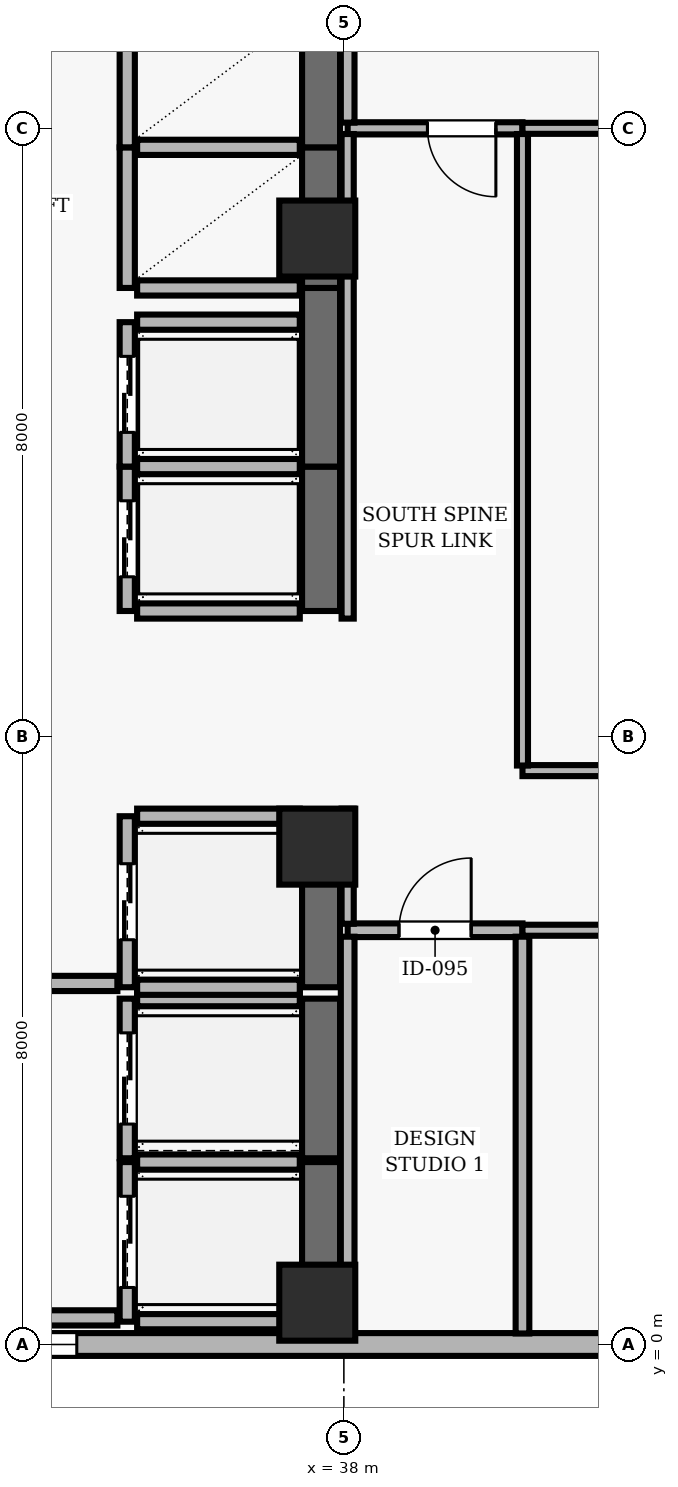
"""IFC4 building model, lengths in metres.
Left out: names, types, materials, properties, quantities, classifications, styles, units other than length and angle.
Written with IfcOpenShell. Run it as: python <this file> out.ifc"""

import sys

from ifc_helpers import new_model, si_unit, direction, frame, frame_2d, origin, origin_2d, place, context, subcontext, project, spatial, rectangle, extrude, element, fill, save


model = new_model("IFC4")
c1 = context("Model", 3, precision=1e-05, world=origin(), true_north=direction((0.0, 1.0)))
c2 = subcontext(c1, "Body", "Model", "MODEL_VIEW")
j1 = project(units=[si_unit("LENGTHUNIT", "METRE"), si_unit("PLANEANGLEUNIT", "RADIAN")], contexts=[c1])
p1 = place(None, origin())
s1 = spatial("IfcSite", under=j1, at=p1, CompositionType="ELEMENT")
p2 = place(p1, origin())
s2 = spatial("IfcBuilding", under=s1, at=p2, CompositionType="ELEMENT")
p3 = place(p2, frame((0.0, 0.0, 187.5)))
s3 = spatial("IfcBuildingStorey", under=s2, at=p3, CompositionType="ELEMENT", Elevation=187.5)
for number, where, z_axis, x_axis in (
    (1, (37.65, 0.55, 0.0), (0.0, 0.0, 1.0), (1.0, 0.0, 0.0)),
    (2, (37.65, 6.55, 0.0), (0.0, 0.0, 1.0), (1.0, 0.0, 0.0)),
    (3, (37.65, 14.55, 0.0), (0.0, 0.0, 1.0), (1.0, 0.0, 0.0)),
):
    element("IfcColumn", number, at=place(p3, frame(where, z_axis=z_axis, x_axis=x_axis)), inside=s3, PredefinedType="COLUMN", context=c2, shape_type="SweptSolid", body=[
        extrude(rectangle(XDim=1.0, YDim=1.0, at=origin_2d()), origin(), (0.0, 0.0, 1.0), 3.9),
    ])
p4 = place(p3, frame((24.5, 0.0, 0.0), z_axis=(0.0, 0.0, 1.0), x_axis=(1.0, 0.0, 0.0)))
e4 = element("IfcWall", 4, at=p4, inside=s3, PredefinedType="SOLIDWALL", context=c2, shape_type="SweptSolid", body=[
    extrude(rectangle(XDim=38.2, YDim=0.3, at=frame_2d((19.1, 0.0))), origin(), (0.0, 0.0, 1.0), 3.69),
])
p5 = place(p4, frame((1.829, 0.0, 0.9)))
e5 = element("IfcOpeningElement", 5, at=p5, cuts=e4, PredefinedType="OPENING", context=c2, shape_type="SweptSolid", body=[
    extrude(rectangle(XDim=1.8, YDim=2.2, at=frame_2d((0.9, 1.1))), frame((0.0, 0.16, 0.0), z_axis=(0.0, -1.0, 0.0), x_axis=(1.0, 0.0, 0.0)), (0.0, 0.0, 1.0), 0.32),
])
p6 = place(p4, frame((8.186, 0.0, 0.9)))
e6 = element("IfcOpeningElement", 6, at=p6, cuts=e4, PredefinedType="OPENING", context=c2, shape_type="SweptSolid", body=[
    extrude(rectangle(XDim=1.8, YDim=2.2, at=frame_2d((0.9, 1.1))), frame((0.0, 0.16, 0.0), z_axis=(0.0, -1.0, 0.0), x_axis=(1.0, 0.0, 0.0)), (0.0, 0.0, 1.0), 0.32),
])
p7 = place(p4, frame((18.2, 0.0, 0.9)))
e7 = element("IfcOpeningElement", 7, at=p7, cuts=e4, PredefinedType="OPENING", context=c2, shape_type="SweptSolid", body=[
    extrude(rectangle(XDim=1.8, YDim=2.2, at=frame_2d((0.9, 1.1))), frame((0.0, 0.16, 0.0), z_axis=(0.0, -1.0, 0.0), x_axis=(1.0, 0.0, 0.0)), (0.0, 0.0, 1.0), 0.32),
])
p8 = place(p4, frame((23.657, 0.0, 0.9)))
e8 = element("IfcOpeningElement", 8, at=p8, cuts=e4, PredefinedType="OPENING", context=c2, shape_type="SweptSolid", body=[
    extrude(rectangle(XDim=1.8, YDim=2.2, at=frame_2d((0.9, 1.1))), frame((0.0, 0.16, 0.0), z_axis=(0.0, -1.0, 0.0), x_axis=(1.0, 0.0, 0.0)), (0.0, 0.0, 1.0), 0.32),
])
p9 = place(p4, frame((29.114, 0.0, 0.9)))
e9 = element("IfcOpeningElement", 9, at=p9, cuts=e4, PredefinedType="OPENING", context=c2, shape_type="SweptSolid", body=[
    extrude(rectangle(XDim=1.8, YDim=2.2, at=frame_2d((0.9, 1.1))), frame((0.0, 0.16, 0.0), z_axis=(0.0, -1.0, 0.0), x_axis=(1.0, 0.0, 0.0)), (0.0, 0.0, 1.0), 0.32),
])
p10 = place(p4, frame((34.571, 0.0, 0.9)))
e10 = element("IfcOpeningElement", 10, at=p10, cuts=e4, PredefinedType="OPENING", context=c2, shape_type="SweptSolid", body=[
    extrude(rectangle(XDim=1.8, YDim=2.2, at=frame_2d((0.9, 1.1))), frame((0.0, 0.16, 0.0), z_axis=(0.0, -1.0, 0.0), x_axis=(1.0, 0.0, 0.0)), (0.0, 0.0, 1.0), 0.32),
])
p11 = place(p3, frame((35.15, 2.4, 0.0), z_axis=(0.0, 0.0, 1.0), x_axis=(0.0, -1.0, 0.0)))
e11 = element("IfcWall", 11, at=p11, inside=s3, PredefinedType="SOLIDWALL", context=c2, shape_type="SweptSolid", body=[
    extrude(rectangle(XDim=2.1, YDim=0.2, at=frame_2d((1.05, 0.0))), origin(), (0.0, 0.0, 1.0), 3.69),
])
p12 = place(p11, frame((0.45, 0.0, 0.0)))
e12 = element("IfcOpeningElement", 12, at=p12, cuts=e11, PredefinedType="OPENING", context=c2, shape_type="SweptSolid", body=[
    extrude(rectangle(XDim=1.2, YDim=2.15, at=frame_2d((0.6, 1.075))), frame((0.0, 0.11, 0.0), z_axis=(0.0, -1.0, 0.0), x_axis=(1.0, 0.0, 0.0)), (0.0, 0.0, 1.0), 0.22),
])
p13 = place(p3, frame((37.7, 0.3, 0.0), z_axis=(0.0, 0.0, 1.0), x_axis=(0.0, 1.0, 0.0)))
e13 = element("IfcWall", 13, at=p13, inside=s3, PredefinedType="SHEAR", context=c2, shape_type="SweptSolid", body=[
    extrude(rectangle(XDim=2.1, YDim=0.5, at=frame_2d((1.05, 0.0))), origin(), (0.0, 0.0, 1.0), 3.69),
])
for number, where, z_axis, x_axis in (
    (14, (35.28, 0.3, 0.0), (0.0, 0.0, 1.0), (1.0, 0.0, 0.0)),
    (15, (37.42, 2.4, 0.0), (0.0, 0.0, 1.0), (-1.0, 0.0, 0.0)),
):
    element("IfcWall", number, at=place(p3, frame(where, z_axis=z_axis, x_axis=x_axis)), inside=s3, PredefinedType="SOLIDWALL", context=c2, shape_type="SweptSolid", body=[
        extrude(rectangle(XDim=2.14, YDim=0.2, at=frame_2d((1.07, 0.0))), origin(), (0.0, 0.0, 1.0), 3.69),
    ])
p14 = place(p3, frame((35.15, 4.55, 0.0), z_axis=(0.0, 0.0, 1.0), x_axis=(0.0, -1.0, 0.0)))
e16 = element("IfcWall", 16, at=p14, inside=s3, PredefinedType="SOLIDWALL", context=c2, shape_type="SweptSolid", body=[
    extrude(rectangle(XDim=2.1, YDim=0.2, at=frame_2d((1.05, 0.0))), origin(), (0.0, 0.0, 1.0), 3.69),
])
p15 = place(p14, frame((0.45, 0.0, 0.0)))
e17 = element("IfcOpeningElement", 17, at=p15, cuts=e16, PredefinedType="OPENING", context=c2, shape_type="SweptSolid", body=[
    extrude(rectangle(XDim=1.2, YDim=2.15, at=frame_2d((0.6, 1.075))), frame((0.0, 0.11, 0.0), z_axis=(0.0, -1.0, 0.0), x_axis=(1.0, 0.0, 0.0)), (0.0, 0.0, 1.0), 0.22),
])
p16 = place(p3, frame((37.7, 2.45, 0.0), z_axis=(0.0, 0.0, 1.0), x_axis=(0.0, 1.0, 0.0)))
e18 = element("IfcWall", 18, at=p16, inside=s3, PredefinedType="SHEAR", context=c2, shape_type="SweptSolid", body=[
    extrude(rectangle(XDim=2.1, YDim=0.5, at=frame_2d((1.05, 0.0))), origin(), (0.0, 0.0, 1.0), 3.69),
])
p17 = place(p3, frame((37.42, 4.55, 0.0), z_axis=(0.0, 0.0, 1.0), x_axis=(-1.0, 0.0, 0.0)))
e19 = element("IfcWall", 19, at=p17, inside=s3, PredefinedType="SOLIDWALL", context=c2, shape_type="SweptSolid", body=[
    extrude(rectangle(XDim=2.14, YDim=0.2, at=frame_2d((1.07, 0.0))), origin(), (0.0, 0.0, 1.0), 3.69),
])
p18 = place(p3, frame((35.15, 6.95, 0.0), z_axis=(0.0, 0.0, 1.0), x_axis=(0.0, -1.0, 0.0)))
e20 = element("IfcWall", 20, at=p18, inside=s3, PredefinedType="SOLIDWALL", context=c2, shape_type="SweptSolid", body=[
    extrude(rectangle(XDim=2.25, YDim=0.2, at=frame_2d((1.125, 0.0))), origin(), (0.0, 0.0, 1.0), 3.69),
])
p19 = place(p18, frame((0.625, 0.0, 0.0)))
e21 = element("IfcOpeningElement", 21, at=p19, cuts=e20, PredefinedType="OPENING", context=c2, shape_type="SweptSolid", body=[
    extrude(rectangle(XDim=1.0, YDim=2.1, at=frame_2d((0.5, 1.05))), frame((0.0, 0.11, 0.0), z_axis=(0.0, -1.0, 0.0), x_axis=(1.0, 0.0, 0.0)), (0.0, 0.0, 1.0), 0.22),
])
p20 = place(p3, frame((37.7, 4.7, 0.0), z_axis=(0.0, 0.0, 1.0), x_axis=(0.0, 1.0, 0.0)))
e22 = element("IfcWall", 22, at=p20, inside=s3, PredefinedType="SHEAR", context=c2, shape_type="SweptSolid", body=[
    extrude(rectangle(XDim=2.25, YDim=0.5, at=frame_2d((1.125, 0.0))), origin(), (0.0, 0.0, 1.0), 3.69),
])
for number, where, z_axis, x_axis in (
    (23, (35.28, 4.7, 0.0), (0.0, 0.0, 1.0), (1.0, 0.0, 0.0)),
    (24, (37.42, 6.95, 0.0), (0.0, 0.0, 1.0), (-1.0, 0.0, 0.0)),
):
    element("IfcWall", number, at=place(p3, frame(where, z_axis=z_axis, x_axis=x_axis)), inside=s3, PredefinedType="SOLIDWALL", context=c2, shape_type="SweptSolid", body=[
        extrude(rectangle(XDim=2.14, YDim=0.2, at=frame_2d((1.07, 0.0))), origin(), (0.0, 0.0, 1.0), 3.69),
    ])
p21 = place(p3, frame((35.15, 11.55, 0.0), z_axis=(0.0, 0.0, 1.0), x_axis=(0.0, -1.0, 0.0)))
e25 = element("IfcWall", 25, at=p21, inside=s3, PredefinedType="SOLIDWALL", context=c2, shape_type="SweptSolid", body=[
    extrude(rectangle(XDim=1.9, YDim=0.2, at=frame_2d((0.95, 0.0))), origin(), (0.0, 0.0, 1.0), 3.69),
])
p22 = place(p21, frame((0.45, 0.0, 0.0)))
e26 = element("IfcOpeningElement", 26, at=p22, cuts=e25, PredefinedType="OPENING", context=c2, shape_type="SweptSolid", body=[
    extrude(rectangle(XDim=1.0, YDim=2.1, at=frame_2d((0.5, 1.05))), frame((0.0, 0.11, 0.0), z_axis=(0.0, -1.0, 0.0), x_axis=(1.0, 0.0, 0.0)), (0.0, 0.0, 1.0), 0.22),
])
p23 = place(p3, frame((37.7, 9.65, 0.0), z_axis=(0.0, 0.0, 1.0), x_axis=(0.0, 1.0, 0.0)))
e27 = element("IfcWall", 27, at=p23, inside=s3, PredefinedType="SHEAR", context=c2, shape_type="SweptSolid", body=[
    extrude(rectangle(XDim=1.9, YDim=0.5, at=frame_2d((0.95, 0.0))), origin(), (0.0, 0.0, 1.0), 3.69),
])
for number, where, z_axis, x_axis in (
    (28, (35.28, 9.65, 0.0), (0.0, 0.0, 1.0), (1.0, 0.0, 0.0)),
    (29, (37.42, 11.55, 0.0), (0.0, 0.0, 1.0), (-1.0, 0.0, 0.0)),
):
    element("IfcWall", number, at=place(p3, frame(where, z_axis=z_axis, x_axis=x_axis)), inside=s3, PredefinedType="SOLIDWALL", context=c2, shape_type="SweptSolid", body=[
        extrude(rectangle(XDim=2.14, YDim=0.2, at=frame_2d((1.07, 0.0))), origin(), (0.0, 0.0, 1.0), 3.69),
    ])
p24 = place(p3, frame((35.15, 13.45, 0.0), z_axis=(0.0, 0.0, 1.0), x_axis=(0.0, -1.0, 0.0)))
e30 = element("IfcWall", 30, at=p24, inside=s3, PredefinedType="SOLIDWALL", context=c2, shape_type="SweptSolid", body=[
    extrude(rectangle(XDim=1.9, YDim=0.2, at=frame_2d((0.95, 0.0))), origin(), (0.0, 0.0, 1.0), 3.69),
])
p25 = place(p24, frame((0.45, 0.0, 0.0)))
e31 = element("IfcOpeningElement", 31, at=p25, cuts=e30, PredefinedType="OPENING", context=c2, shape_type="SweptSolid", body=[
    extrude(rectangle(XDim=1.0, YDim=2.1, at=frame_2d((0.5, 1.05))), frame((0.0, 0.11, 0.0), z_axis=(0.0, -1.0, 0.0), x_axis=(1.0, 0.0, 0.0)), (0.0, 0.0, 1.0), 0.22),
])
p26 = place(p3, frame((37.7, 11.55, 0.0), z_axis=(0.0, 0.0, 1.0), x_axis=(0.0, 1.0, 0.0)))
e32 = element("IfcWall", 32, at=p26, inside=s3, PredefinedType="SHEAR", context=c2, shape_type="SweptSolid", body=[
    extrude(rectangle(XDim=2.35, YDim=0.5, at=frame_2d((1.175, 0.0))), origin(), (0.0, 0.0, 1.0), 3.69),
])
p27 = place(p3, frame((37.42, 13.45, 0.0), z_axis=(0.0, 0.0, 1.0), x_axis=(-1.0, 0.0, 0.0)))
e33 = element("IfcWall", 33, at=p27, inside=s3, PredefinedType="SOLIDWALL", context=c2, shape_type="SweptSolid", body=[
    extrude(rectangle(XDim=2.14, YDim=0.2, at=frame_2d((1.07, 0.0))), origin(), (0.0, 0.0, 1.0), 3.69),
])
p28 = place(p3, frame((35.15, 15.75, 0.0), z_axis=(0.0, 0.0, 1.0), x_axis=(0.0, -1.0, 0.0)))
e34 = element("IfcWall", 34, at=p28, inside=s3, PredefinedType="SOLIDWALL", context=c2, shape_type="SweptSolid", body=[
    extrude(rectangle(XDim=1.85, YDim=0.2, at=frame_2d((0.925, 0.0))), origin(), (0.0, 0.0, 1.0), 3.69),
])
p29 = place(p3, frame((37.7, 13.9, 0.0), z_axis=(0.0, 0.0, 1.0), x_axis=(0.0, 1.0, 0.0)))
e35 = element("IfcWall", 35, at=p29, inside=s3, PredefinedType="SHEAR", context=c2, shape_type="SweptSolid", body=[
    extrude(rectangle(XDim=1.85, YDim=0.5, at=frame_2d((0.925, 0.0))), origin(), (0.0, 0.0, 1.0), 3.69),
])
for number, where, z_axis, x_axis in (
    (36, (35.28, 13.9, 0.0), (0.0, 0.0, 1.0), (1.0, 0.0, 0.0)),
    (37, (37.42, 15.75, 0.0), (0.0, 0.0, 1.0), (-1.0, 0.0, 0.0)),
):
    element("IfcWall", number, at=place(p3, frame(where, z_axis=z_axis, x_axis=x_axis)), inside=s3, PredefinedType="SOLIDWALL", context=c2, shape_type="SweptSolid", body=[
        extrude(rectangle(XDim=2.14, YDim=0.2, at=frame_2d((1.07, 0.0))), origin(), (0.0, 0.0, 1.0), 3.69),
    ])
p30 = place(p3, frame((35.15, 17.6, 0.0), z_axis=(0.0, 0.0, 1.0), x_axis=(0.0, -1.0, 0.0)))
e38 = element("IfcWall", 38, at=p30, inside=s3, PredefinedType="SOLIDWALL", context=c2, shape_type="SweptSolid", body=[
    extrude(rectangle(XDim=1.85, YDim=0.2, at=frame_2d((0.925, 0.0))), origin(), (0.0, 0.0, 1.0), 3.69),
])
p31 = place(p3, frame((37.7, 15.75, 0.0), z_axis=(0.0, 0.0, 1.0), x_axis=(0.0, 1.0, 0.0)))
e39 = element("IfcWall", 39, at=p31, inside=s3, PredefinedType="SHEAR", context=c2, shape_type="SweptSolid", body=[
    extrude(rectangle(XDim=1.85, YDim=0.5, at=frame_2d((0.925, 0.0))), origin(), (0.0, 0.0, 1.0), 3.69),
])
p32 = place(p3, frame((31.65, 0.35, 0.0), z_axis=(0.0, 0.0, 1.0), x_axis=(1.0, 0.0, 0.0)))
e40 = element("IfcWall", 40, at=p32, inside=s3, PredefinedType="SOLIDWALL", context=c2, shape_type="SweptSolid", body=[
    extrude(rectangle(XDim=3.37, YDim=0.2, at=frame_2d((1.685, 0.0))), origin(), (0.0, 0.0, 1.0), 3.69),
])
p33 = place(p3, frame((35.02, 4.75, 0.0), z_axis=(0.0, 0.0, 1.0), x_axis=(-1.0, 0.0, 0.0)))
e41 = element("IfcWall", 41, at=p33, inside=s3, PredefinedType="SOLIDWALL", context=c2, shape_type="SweptSolid", body=[
    extrude(rectangle(XDim=3.11, YDim=0.2, at=frame_2d((1.555, 0.0))), origin(), (0.0, 0.0, 1.0), 3.69),
])
p34 = place(p33, frame((1.03, 0.0, 0.0)))
e42 = element("IfcOpeningElement", 42, at=p34, cuts=e41, PredefinedType="OPENING", context=c2, shape_type="SweptSolid", body=[
    extrude(rectangle(XDim=1.05, YDim=2.15, at=frame_2d((0.525, 1.075))), frame((0.0, 0.11, 0.0), z_axis=(0.0, -1.0, 0.0), x_axis=(1.0, 0.0, 0.0)), (0.0, 0.0, 1.0), 0.22),
])
p35 = place(p3, frame((38.05, 5.45, 0.0), z_axis=(0.0, 0.0, 1.0), x_axis=(1.0, 0.0, 0.0)))
e43 = element("IfcWall", 43, at=p35, inside=s3, PredefinedType="PARTITIONING", context=c2, shape_type="SweptSolid", body=[
    extrude(rectangle(XDim=2.3, YDim=0.18, at=frame_2d((1.15, 0.0))), origin(), (0.0, 0.0, 1.0), 3.372),
])
p36 = place(p35, frame((0.675, 0.0, 0.0)))
e44 = element("IfcOpeningElement", 44, at=p36, cuts=e43, PredefinedType="OPENING", context=c2, shape_type="SweptSolid", body=[
    extrude(rectangle(XDim=0.95, YDim=2.1, at=frame_2d((0.475, 1.05))), frame((0.0, 0.1, 0.0), z_axis=(0.0, -1.0, 0.0), x_axis=(1.0, 0.0, 0.0)), (0.0, 0.0, 1.0), 0.2),
])
p37 = place(p3, frame((40.35, 5.45, 0.0), z_axis=(0.0, 0.0, 1.0), x_axis=(1.0, 0.0, 0.0)))
e45 = element("IfcWall", 45, at=p37, inside=s3, PredefinedType="PARTITIONING", context=c2, shape_type="SweptSolid", body=[
    extrude(rectangle(XDim=11.65, YDim=0.145, at=frame_2d((5.825, 0.0))), origin(), (0.0, 0.0, 1.0), 3.372),
])
p38 = place(p37, frame((5.275, 0.0, 0.0)))
e46 = element("IfcOpeningElement", 46, at=p38, cuts=e45, PredefinedType="OPENING", context=c2, shape_type="SweptSolid", body=[
    extrude(rectangle(XDim=1.1, YDim=2.15, at=frame_2d((0.55, 1.075))), frame((0.0, 0.083, 0.0), z_axis=(0.0, -1.0, 0.0), x_axis=(1.0, 0.0, 0.0)), (0.0, 0.0, 1.0), 0.165),
])
p39 = place(p3, frame((40.35, 16.0, 0.0), z_axis=(0.0, 0.0, 1.0), x_axis=(-1.0, 0.0, 0.0)))
e47 = element("IfcWall", 47, at=p39, inside=s3, PredefinedType="PARTITIONING", context=c2, shape_type="SweptSolid", body=[
    extrude(rectangle(XDim=2.3, YDim=0.16, at=frame_2d((1.15, 0.0))), origin(), (0.0, 0.0, 1.0), 3.69),
])
p40 = place(p39, frame((0.35, 0.0, 0.0)))
e48 = element("IfcOpeningElement", 48, at=p40, cuts=e47, PredefinedType="OPENING", context=c2, shape_type="SweptSolid", body=[
    extrude(rectangle(XDim=0.9, YDim=2.1, at=frame_2d((0.45, 1.05))), frame((0.0, 0.09, 0.0), z_axis=(0.0, -1.0, 0.0), x_axis=(1.0, 0.0, 0.0)), (0.0, 0.0, 1.0), 0.18),
])
p41 = place(p3, frame((40.35, 16.0, 0.0), z_axis=(0.0, 0.0, 1.0), x_axis=(1.0, 0.0, 0.0)))
e49 = element("IfcWall", 49, at=p41, inside=s3, PredefinedType="PARTITIONING", context=c2, shape_type="SweptSolid", body=[
    extrude(rectangle(XDim=8.055, YDim=0.145, at=frame_2d((4.027, 0.0))), origin(), (0.0, 0.0, 1.0), 3.39),
])
p42 = place(p3, frame((52.0, 7.55, 0.0), z_axis=(0.0, 0.0, 1.0), x_axis=(-1.0, 0.0, 0.0)))
e50 = element("IfcWall", 50, at=p42, inside=s3, PredefinedType="PARTITIONING", context=c2, shape_type="SweptSolid", body=[
    extrude(rectangle(XDim=11.65, YDim=0.145, at=frame_2d((5.825, 0.0))), origin(), (0.0, 0.0, 1.0), 3.146),
])
p43 = place(p42, frame((3.175, 0.0, 0.0)))
e51 = element("IfcOpeningElement", 51, at=p43, cuts=e50, PredefinedType="OPENING", context=c2, shape_type="SweptSolid", body=[
    extrude(rectangle(XDim=1.1, YDim=2.15, at=frame_2d((0.55, 1.075))), frame((0.0, 0.083, 0.0), z_axis=(0.0, -1.0, 0.0), x_axis=(1.0, 0.0, 0.0)), (0.0, 0.0, 1.0), 0.165),
])
p44 = place(p3, frame((38.05, 5.365, 0.0), z_axis=(0.0, 0.0, 1.0), x_axis=(0.0, -1.0, 0.0)))
e52 = element("IfcWall", 52, at=p44, inside=s3, PredefinedType="PARTITIONING", context=c2, shape_type="SweptSolid", body=[
    extrude(rectangle(XDim=5.22, YDim=0.18, at=frame_2d((2.61, 0.0))), origin(), (0.0, 0.0, 1.0), 3.146),
])
p45 = place(p3, frame((38.05, 7.05, 0.0), z_axis=(0.0, 0.0, 1.0), x_axis=(0.0, -1.0, 0.0)))
e53 = element("IfcWall", 53, at=p45, inside=s3, PredefinedType="PARTITIONING", context=c2, shape_type="SweptSolid", body=[
    extrude(rectangle(XDim=1.515, YDim=0.16, at=frame_2d((0.758, 0.0))), origin(), (0.0, 0.0, 1.0), 3.146),
])
p46 = place(p3, frame((38.05, 15.925, 0.0), z_axis=(0.0, 0.0, 1.0), x_axis=(0.0, -1.0, 0.0)))
e54 = element("IfcWall", 54, at=p46, inside=s3, PredefinedType="PARTITIONING", context=c2, shape_type="SweptSolid", body=[
    extrude(rectangle(XDim=6.375, YDim=0.16, at=frame_2d((3.188, 0.0))), origin(), (0.0, 0.0, 1.0), 3.146),
])
p47 = place(p3, frame((38.05, 23.843, 0.0), z_axis=(0.0, 0.0, 1.0), x_axis=(0.0, -1.0, 0.0)))
e55 = element("IfcWall", 55, at=p47, inside=s3, PredefinedType="PARTITIONING", context=c2, shape_type="SweptSolid", body=[
    extrude(rectangle(XDim=7.768, YDim=0.18, at=frame_2d((3.884, 0.0))), origin(), (0.0, 0.0, 1.0), 3.146),
])
p48 = place(p3, frame((40.35, 0.145, 0.0), z_axis=(0.0, 0.0, 1.0), x_axis=(0.0, 1.0, 0.0)))
e56 = element("IfcWall", 56, at=p48, inside=s3, PredefinedType="PARTITIONING", context=c2, shape_type="SweptSolid", body=[
    extrude(rectangle(XDim=5.22, YDim=0.18, at=frame_2d((2.61, 0.0))), origin(), (0.0, 0.0, 1.0), 3.69),
])
p49 = place(p3, frame((40.35, 7.617, 0.0), z_axis=(0.0, 0.0, 1.0), x_axis=(0.0, 1.0, 0.0)))
e57 = element("IfcWall", 57, at=p49, inside=s3, PredefinedType="PARTITIONING", context=c2, shape_type="SweptSolid", body=[
    extrude(rectangle(XDim=8.308, YDim=0.145, at=frame_2d((4.154, 0.0))), origin(), (0.0, 0.0, 1.0), 3.372),
])
p50 = place(p6, origin())
e58 = element("IfcWindow", 58, at=p50, inside=s3, PartitioningType="SINGLE_PANEL", PredefinedType="WINDOW", context=c2, shape_type="SweptSolid", body=[
    extrude(rectangle(XDim=1.8, YDim=2.2, at=frame_2d((0.9, 1.1))), frame((0.0, 0.03, 0.0), z_axis=(0.0, -1.0, 0.0), x_axis=(1.0, 0.0, 0.0)), (0.0, 0.0, 1.0), 0.06),
])
fill(e6, e58)
p51 = place(p12, origin())
e59 = element("IfcDoor", 59, at=p51, inside=s3, OperationType="DOUBLE_DOOR_SLIDING", PredefinedType="DOOR", context=c2, shape_type="SweptSolid", body=[
    extrude(rectangle(XDim=1.2, YDim=2.15, at=frame_2d((0.6, 1.075))), frame((0.0, 0.025, 0.0), z_axis=(0.0, -1.0, 0.0), x_axis=(1.0, 0.0, 0.0)), (0.0, 0.0, 1.0), 0.05),
])
fill(e12, e59)
p52 = place(p15, origin())
e60 = element("IfcDoor", 60, at=p52, inside=s3, OperationType="DOUBLE_DOOR_SLIDING", PredefinedType="DOOR", context=c2, shape_type="SweptSolid", body=[
    extrude(rectangle(XDim=1.2, YDim=2.15, at=frame_2d((0.6, 1.075))), frame((0.0, 0.025, 0.0), z_axis=(0.0, -1.0, 0.0), x_axis=(1.0, 0.0, 0.0)), (0.0, 0.0, 1.0), 0.05),
])
fill(e17, e60)
p53 = place(p19, origin())
e61 = element("IfcDoor", 61, at=p53, inside=s3, OperationType="DOUBLE_DOOR_SLIDING", PredefinedType="DOOR", context=c2, shape_type="SweptSolid", body=[
    extrude(rectangle(XDim=1.0, YDim=2.1, at=frame_2d((0.5, 1.05))), frame((0.0, 0.025, 0.0), z_axis=(0.0, -1.0, 0.0), x_axis=(1.0, 0.0, 0.0)), (0.0, 0.0, 1.0), 0.05),
])
fill(e21, e61)
p54 = place(p22, origin())
e62 = element("IfcDoor", 62, at=p54, inside=s3, OperationType="DOUBLE_DOOR_SLIDING", PredefinedType="DOOR", context=c2, shape_type="SweptSolid", body=[
    extrude(rectangle(XDim=1.0, YDim=2.1, at=frame_2d((0.5, 1.05))), frame((0.0, 0.025, 0.0), z_axis=(0.0, -1.0, 0.0), x_axis=(1.0, 0.0, 0.0)), (0.0, 0.0, 1.0), 0.05),
])
fill(e26, e62)
p55 = place(p25, origin())
e63 = element("IfcDoor", 63, at=p55, inside=s3, OperationType="DOUBLE_DOOR_SLIDING", PredefinedType="DOOR", context=c2, shape_type="SweptSolid", body=[
    extrude(rectangle(XDim=1.0, YDim=2.1, at=frame_2d((0.5, 1.05))), frame((0.0, 0.025, 0.0), z_axis=(0.0, -1.0, 0.0), x_axis=(1.0, 0.0, 0.0)), (0.0, 0.0, 1.0), 0.05),
])
fill(e31, e63)
p56 = place(p36, origin())
e64 = element("IfcDoor", 64, at=p56, inside=s3, OperationType="SINGLE_SWING_RIGHT", PredefinedType="DOOR", context=c2, shape_type="SweptSolid", body=[
    extrude(rectangle(XDim=0.95, YDim=2.1, at=frame_2d((0.475, 1.05))), frame((0.0, 0.025, 0.0), z_axis=(0.0, -1.0, 0.0), x_axis=(1.0, 0.0, 0.0)), (0.0, 0.0, 1.0), 0.05),
])
fill(e44, e64)
p57 = place(p40, origin())
e65 = element("IfcDoor", 65, at=p57, inside=s3, OperationType="SINGLE_SWING_LEFT", PredefinedType="DOOR", context=c2, shape_type="SweptSolid", body=[
    extrude(rectangle(XDim=0.9, YDim=2.1, at=frame_2d((0.45, 1.05))), frame((0.0, 0.025, 0.0), z_axis=(0.0, -1.0, 0.0), x_axis=(1.0, 0.0, 0.0)), (0.0, 0.0, 1.0), 0.05),
])
fill(e48, e65)
save(model, sys.argv[1])
